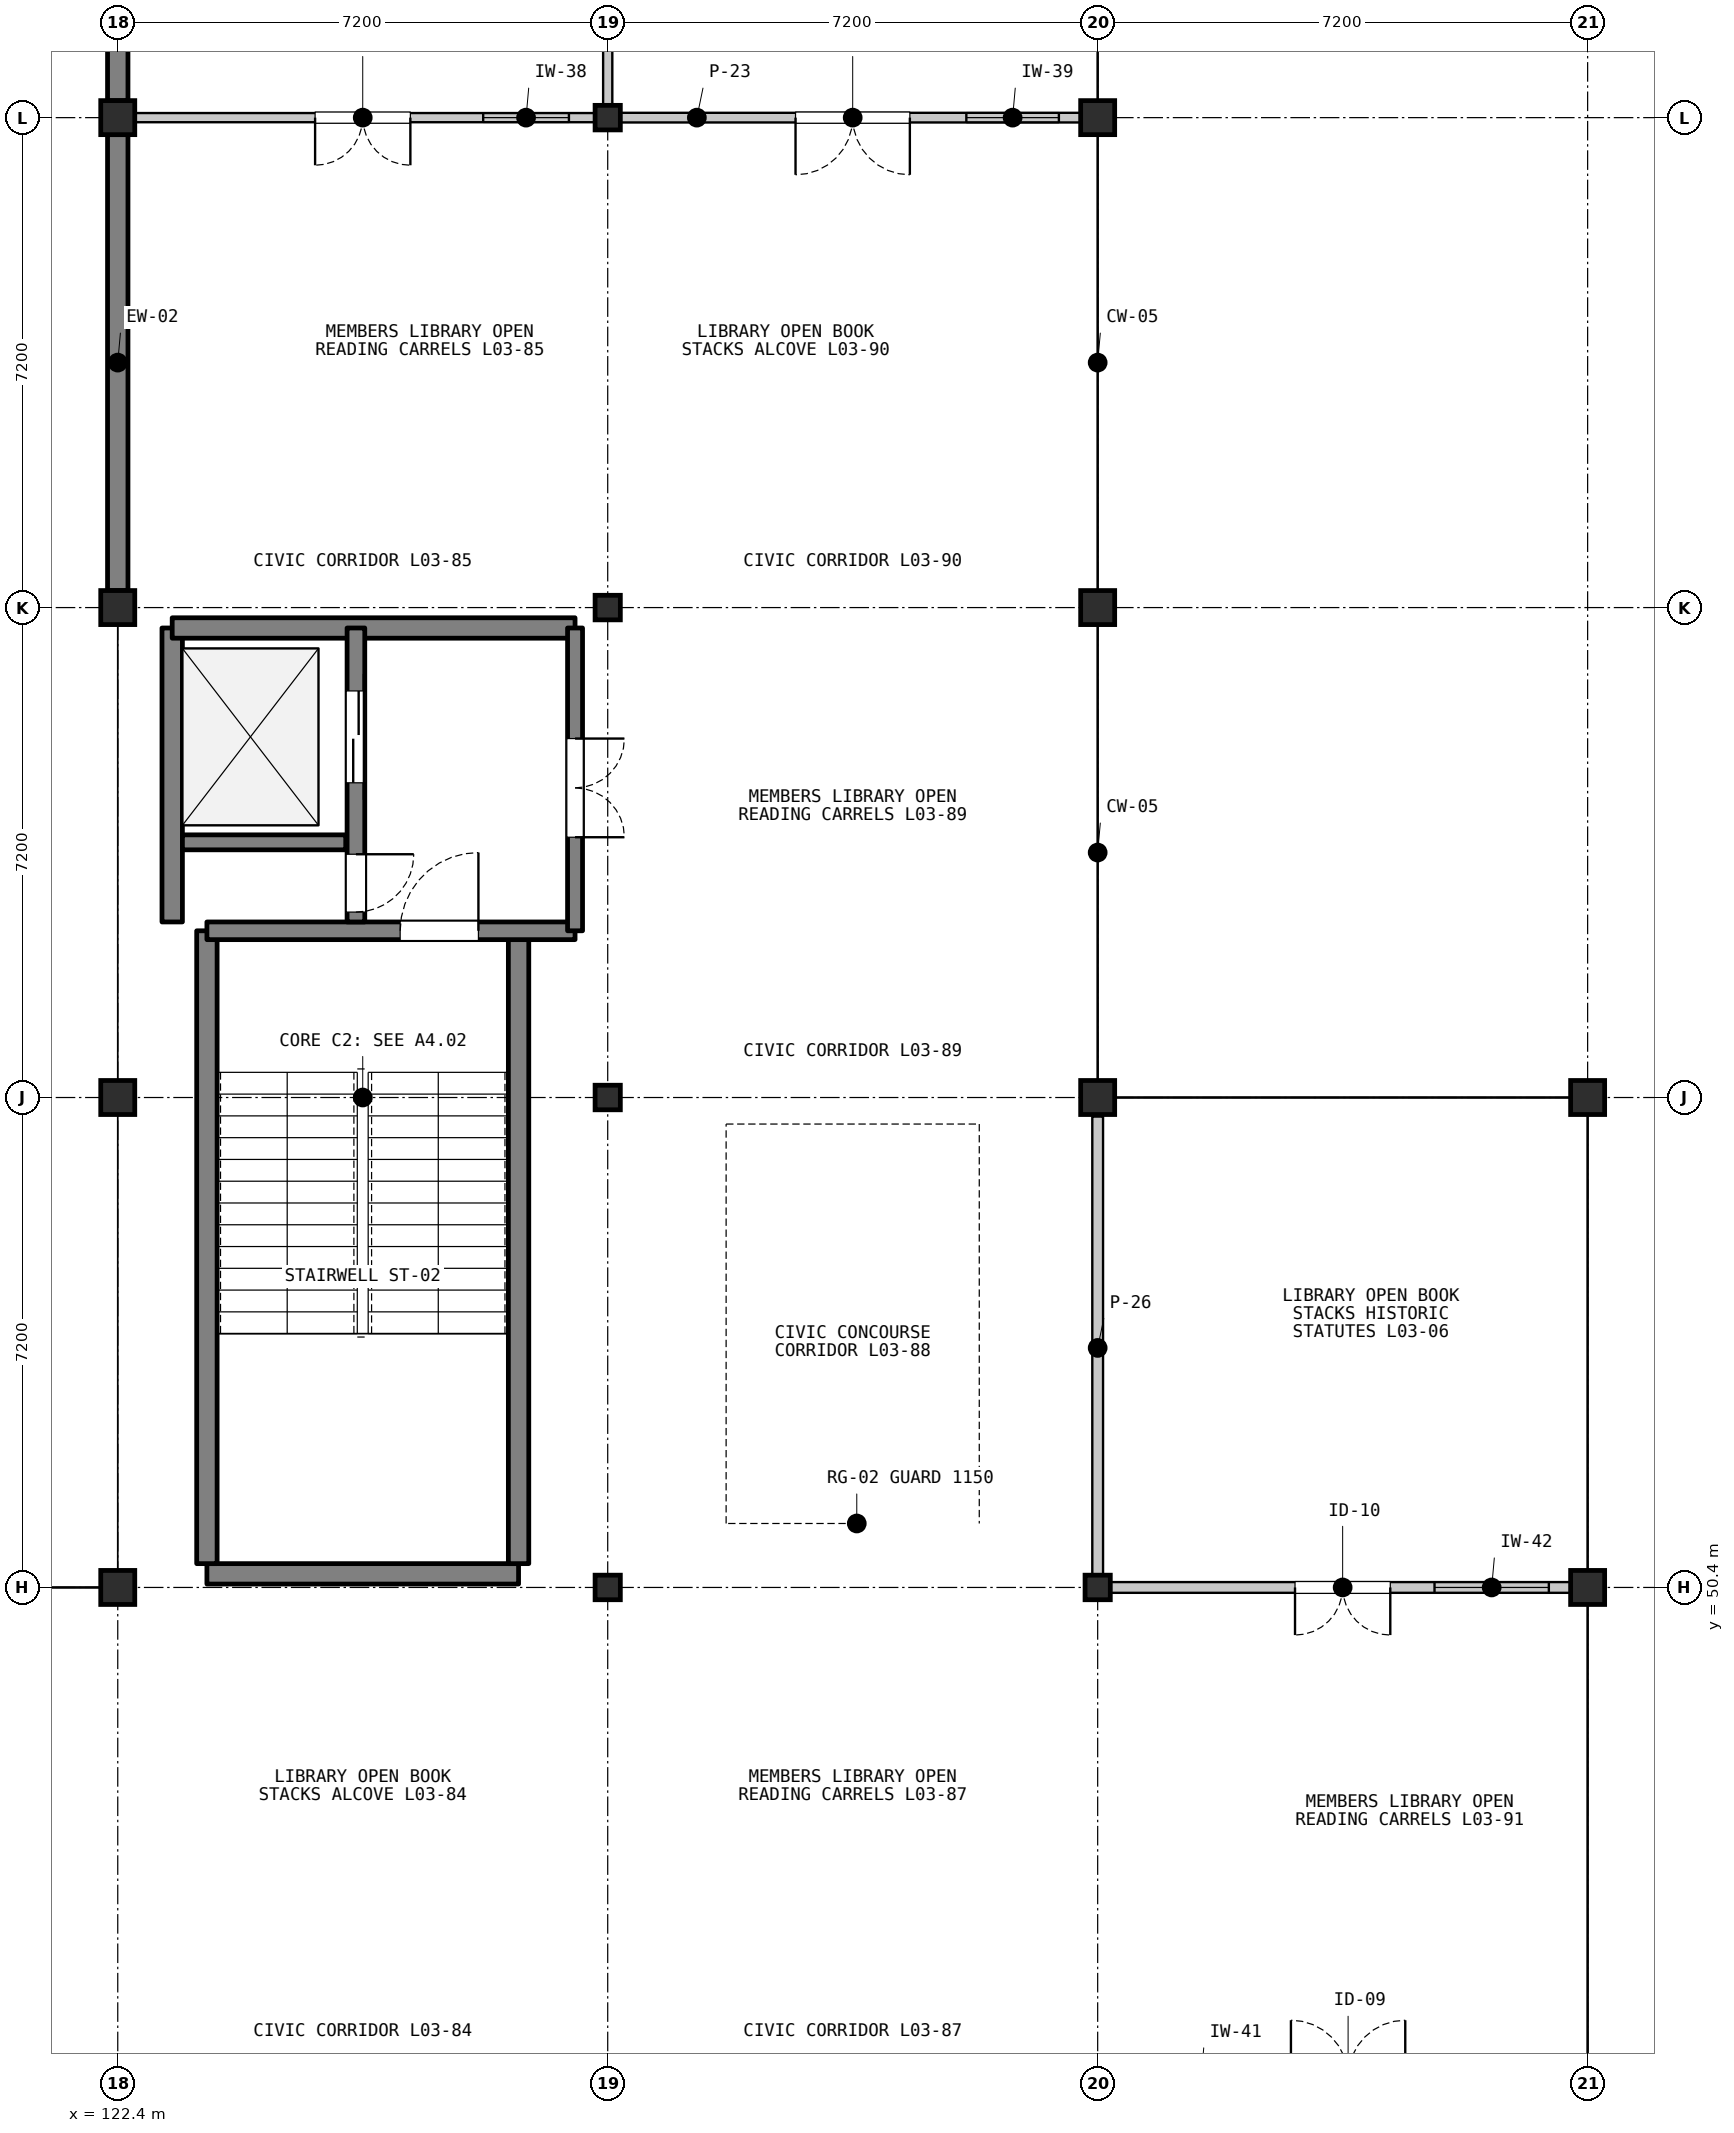
"""IFC4 building model, lengths in metres.
Left out: names, types, materials, properties, quantities, classifications, styles, units other than length and angle.
Written with IfcOpenShell. Run it as: python <this file> out.ifc"""

import sys

from ifc_helpers import new_model, si_unit, direction, frame, frame_2d, origin, origin_2d, place, context, subcontext, project, spatial, rectangle, i_section, extrude, element, fill, save


model = new_model("IFC4")
c1 = context("Model", 3, precision=1e-05, world=origin(), true_north=direction((0.0, 1.0)))
c2 = subcontext(c1, "Body", "Model", "MODEL_VIEW")
j1 = project(units=[si_unit("LENGTHUNIT", "METRE"), si_unit("PLANEANGLEUNIT", "RADIAN")], contexts=[c1])
p1 = place(None, origin())
s1 = spatial("IfcSite", under=j1, at=p1, CompositionType="ELEMENT")
p2 = place(p1, origin())
s2 = spatial("IfcBuilding", under=s1, at=p2, CompositionType="ELEMENT")
p3 = place(p2, frame((0.0, 0.0, 9.9)))
s3 = spatial("IfcBuildingStorey", under=s2, at=p3, CompositionType="ELEMENT", Elevation=9.9)
for number, where, z_axis, x_axis in (
    (1, (122.4, 50.4, 0.0), (0.0, 0.0, 1.0), (1.0, 0.0, 0.0)),
    (2, (122.4, 57.6, 0.0), (0.0, 0.0, 1.0), (1.0, 0.0, 0.0)),
    (3, (122.4, 64.8, 0.0), (0.0, 0.0, 1.0), (1.0, 0.0, 0.0)),
    (4, (122.4, 72.0, 0.0), (0.0, 0.0, 1.0), (1.0, 0.0, 0.0)),
):
    element("IfcColumn", number, at=place(p3, frame(where, z_axis=z_axis, x_axis=x_axis)), inside=s3, PredefinedType="COLUMN", context=c2, shape_type="SweptSolid", body=[
        extrude(rectangle(XDim=0.5, YDim=0.5, at=origin_2d()), origin(), (0.0, 0.0, 1.0), 4.2),
    ])
for number, where, z_axis, x_axis in (
    (5, (129.6, 50.4, 0.0), (0.0, 0.0, 1.0), (1.0, 0.0, 0.0)),
    (6, (129.6, 57.6, 0.0), (0.0, 0.0, 1.0), (1.0, 0.0, 0.0)),
    (7, (129.6, 64.8, 0.0), (0.0, 0.0, 1.0), (1.0, 0.0, 0.0)),
    (8, (129.6, 72.0, 0.0), (0.0, 0.0, 1.0), (1.0, 0.0, 0.0)),
    (9, (136.8, 50.4, 0.0), (0.0, 0.0, 1.0), (1.0, 0.0, 0.0)),
):
    element("IfcColumn", number, at=place(p3, frame(where, z_axis=z_axis, x_axis=x_axis)), inside=s3, PredefinedType="COLUMN", context=c2, shape_type="SweptSolid", body=[
        extrude(i_section(OverallWidth=0.371, OverallDepth=0.361, WebThickness=0.012, FlangeThickness=0.02, FilletRadius=0.015, at=origin_2d()), origin(), (0.0, 0.0, 1.0), 4.2),
    ])
for number, where, z_axis, x_axis in (
    (10, (136.8, 57.6, 0.0), (0.0, 0.0, 1.0), (1.0, 0.0, 0.0)),
    (11, (136.8, 64.8, 0.0), (0.0, 0.0, 1.0), (1.0, 0.0, 0.0)),
    (12, (136.8, 72.0, 0.0), (0.0, 0.0, 1.0), (1.0, 0.0, 0.0)),
    (13, (144.0, 50.4, 0.0), (0.0, 0.0, 1.0), (1.0, 0.0, 0.0)),
    (14, (144.0, 57.6, 0.0), (0.0, 0.0, 1.0), (1.0, 0.0, 0.0)),
):
    element("IfcColumn", number, at=place(p3, frame(where, z_axis=z_axis, x_axis=x_axis)), inside=s3, PredefinedType="COLUMN", context=c2, shape_type="SweptSolid", body=[
        extrude(rectangle(XDim=0.5, YDim=0.5, at=origin_2d()), origin(), (0.0, 0.0, 1.0), 4.2),
    ])
p4 = place(p3, frame((122.4, 65.05, 0.0), z_axis=(0.0, 0.0, 1.0), x_axis=(0.0, 1.0, 0.0)))
e15 = element("IfcWall", 15, at=p4, inside=s3, PredefinedType="SOLIDWALL", context=c2, shape_type="SweptSolid", body=[
    extrude(rectangle(XDim=6.7, YDim=0.3, at=frame_2d((3.35, 0.0))), origin(), (0.0, 0.0, 1.0), 3.487),
])
p5 = place(p3, frame((122.4, 72.25, 0.0), z_axis=(0.0, 0.0, 1.0), x_axis=(0.0, 1.0, 0.0)))
e16 = element("IfcWall", 16, at=p5, inside=s3, PredefinedType="SOLIDWALL", context=c2, shape_type="SweptSolid", body=[
    extrude(rectangle(XDim=6.7, YDim=0.3, at=frame_2d((3.35, 0.0))), origin(), (0.0, 0.0, 1.0), 3.487),
])
p6 = place(p5, frame((2.225, 0.0, 0.95)))
e17 = element("IfcOpeningElement", 17, at=p6, cuts=e16, PredefinedType="OPENING", context=c2, shape_type="SweptSolid", body=[
    extrude(rectangle(XDim=2.25, YDim=2.05, at=frame_2d((1.125, 1.025))), frame((0.0, 0.16, 0.0), z_axis=(0.0, -1.0, 0.0), x_axis=(1.0, 0.0, 0.0)), (0.0, 0.0, 1.0), 0.32),
])
p7 = place(p3, frame((123.71, 50.6, 0.0), z_axis=(0.0, 0.0, 1.0), x_axis=(1.0, 0.0, 0.0)))
e18 = element("IfcWall", 18, at=p7, inside=s3, PredefinedType="SHEAR", context=c2, shape_type="SweptSolid", body=[
    extrude(rectangle(XDim=4.58, YDim=0.3, at=frame_2d((2.29, 0.0))), origin(), (0.0, 0.0, 1.0), 4.02),
])
for number, where, z_axis, x_axis in (
    (19, (123.71, 50.75, 0.0), (0.0, 0.0, 1.0), (0.0, 1.0, 0.0)),
    (20, (128.29, 50.75, 0.0), (0.0, 0.0, 1.0), (0.0, 1.0, 0.0)),
):
    element("IfcWall", number, at=place(p3, frame(where, z_axis=z_axis, x_axis=x_axis)), inside=s3, PredefinedType="SHEAR", context=c2, shape_type="SweptSolid", body=[
        extrude(rectangle(XDim=9.3, YDim=0.3, at=frame_2d((4.65, 0.0))), origin(), (0.0, 0.0, 1.0), 4.02),
    ])
p8 = place(p3, frame((123.71, 60.05, 0.0), z_axis=(0.0, 0.0, 1.0), x_axis=(1.0, 0.0, 0.0)))
e21 = element("IfcWall", 21, at=p8, inside=s3, PredefinedType="SHEAR", context=c2, shape_type="SweptSolid", body=[
    extrude(rectangle(XDim=5.41, YDim=0.26, at=frame_2d((2.705, 0.0))), origin(), (0.0, 0.0, 1.0), 4.02),
])
p9 = place(p8, frame((2.84, 0.0, 0.0)))
e22 = element("IfcOpeningElement", 22, at=p9, cuts=e21, PredefinedType="OPENING", context=c2, shape_type="SweptSolid", body=[
    extrude(rectangle(XDim=1.15, YDim=2.15, at=frame_2d((0.575, 1.075))), frame((0.0, 0.14, 0.0), z_axis=(0.0, -1.0, 0.0), x_axis=(1.0, 0.0, 0.0)), (0.0, 0.0, 1.0), 0.28),
])
p10 = place(p3, frame((123.2, 60.18, 0.0), z_axis=(0.0, 0.0, 1.0), x_axis=(0.0, 1.0, 0.0)))
e23 = element("IfcWall", 23, at=p10, inside=s3, PredefinedType="SHEAR", context=c2, shape_type="SweptSolid", body=[
    extrude(rectangle(XDim=4.32, YDim=0.3, at=frame_2d((2.16, 0.0))), origin(), (0.0, 0.0, 1.0), 4.02),
])
p11 = place(p3, frame((123.2, 64.5, 0.0), z_axis=(0.0, 0.0, 1.0), x_axis=(1.0, 0.0, 0.0)))
e24 = element("IfcWall", 24, at=p11, inside=s3, PredefinedType="SHEAR", context=c2, shape_type="SweptSolid", body=[
    extrude(rectangle(XDim=5.92, YDim=0.3, at=frame_2d((2.96, 0.0))), origin(), (0.0, 0.0, 1.0), 4.02),
])
p12 = place(p3, frame((123.35, 61.35, 0.0), z_axis=(0.0, 0.0, 1.0), x_axis=(1.0, 0.0, 0.0)))
e25 = element("IfcWall", 25, at=p12, inside=s3, PredefinedType="SHEAR", context=c2, shape_type="SweptSolid", body=[
    extrude(rectangle(XDim=2.4, YDim=0.22, at=frame_2d((1.2, 0.0))), origin(), (0.0, 0.0, 1.0), 4.02),
])
p13 = place(p3, frame((125.9, 64.5, 0.0), z_axis=(0.0, 0.0, 1.0), x_axis=(0.0, -1.0, 0.0)))
e26 = element("IfcWall", 26, at=p13, inside=s3, PredefinedType="SHEAR", context=c2, shape_type="SweptSolid", body=[
    extrude(rectangle(XDim=4.32, YDim=0.26, at=frame_2d((2.16, 0.0))), origin(), (0.0, 0.0, 1.0), 4.02),
])
p14 = place(p13, frame((0.925, 0.0, 0.0)))
e27 = element("IfcOpeningElement", 27, at=p14, cuts=e26, PredefinedType="OPENING", context=c2, shape_type="SweptSolid", body=[
    extrude(rectangle(XDim=1.35, YDim=2.2, at=frame_2d((0.675, 1.1))), frame((0.0, 0.14, 0.0), z_axis=(0.0, -1.0, 0.0), x_axis=(1.0, 0.0, 0.0)), (0.0, 0.0, 1.0), 0.28),
])
p15 = place(p13, frame((3.325, 0.0, 0.0)))
e28 = element("IfcOpeningElement", 28, at=p15, cuts=e26, PredefinedType="OPENING", context=c2, shape_type="SweptSolid", body=[
    extrude(rectangle(XDim=0.85, YDim=2.05, at=frame_2d((0.425, 1.025))), frame((0.0, 0.14, 0.0), z_axis=(0.0, -1.0, 0.0), x_axis=(1.0, 0.0, 0.0)), (0.0, 0.0, 1.0), 0.28),
])
p16 = place(p3, frame((129.12, 64.5, 0.0), z_axis=(0.0, 0.0, 1.0), x_axis=(0.0, -1.0, 0.0)))
e29 = element("IfcWall", 29, at=p16, inside=s3, PredefinedType="SHEAR", context=c2, shape_type="SweptSolid", body=[
    extrude(rectangle(XDim=4.45, YDim=0.22, at=frame_2d((2.225, 0.0))), origin(), (0.0, 0.0, 1.0), 4.02),
])
p17 = place(p16, frame((1.625, 0.0, 0.0)))
e30 = element("IfcOpeningElement", 30, at=p17, cuts=e29, PredefinedType="OPENING", context=c2, shape_type="SweptSolid", body=[
    extrude(rectangle(XDim=1.45, YDim=2.2, at=frame_2d((0.725, 1.1))), frame((0.0, 0.12, 0.0), z_axis=(0.0, -1.0, 0.0), x_axis=(1.0, 0.0, 0.0)), (0.0, 0.0, 1.0), 0.24),
])
p18 = place(p3, frame((129.48, 72.0, 0.0), z_axis=(0.0, 0.0, 1.0), x_axis=(-1.0, 0.0, 0.0)))
e31 = element("IfcWall", 31, at=p18, inside=s3, PredefinedType="PARTITIONING", context=c2, shape_type="SweptSolid", body=[
    extrude(rectangle(XDim=6.96, YDim=0.135, at=frame_2d((3.48, 0.0))), origin(), (0.0, 0.0, 1.0), 3.398),
])
p19 = place(p18, frame((2.78, 0.0, 0.0)))
e32 = element("IfcOpeningElement", 32, at=p19, cuts=e31, PredefinedType="OPENING", context=c2, shape_type="SweptSolid", body=[
    extrude(rectangle(XDim=1.4, YDim=2.25, at=frame_2d((0.7, 1.125))), frame((0.0, 0.077, 0.0), z_axis=(0.0, -1.0, 0.0), x_axis=(1.0, 0.0, 0.0)), (0.0, 0.0, 1.0), 0.155),
])
p20 = place(p18, frame((0.45, 0.0, 1.05)))
e33 = element("IfcOpeningElement", 33, at=p20, cuts=e31, PredefinedType="OPENING", context=c2, shape_type="SweptSolid", body=[
    extrude(rectangle(XDim=1.26, YDim=1.1, at=frame_2d((0.63, 0.55))), frame((0.0, 0.077, 0.0), z_axis=(0.0, -1.0, 0.0), x_axis=(1.0, 0.0, 0.0)), (0.0, 0.0, 1.0), 0.155),
])
p21 = place(p3, frame((129.6, 79.08, 0.0), z_axis=(0.0, 0.0, 1.0), x_axis=(0.0, -1.0, 0.0)))
e34 = element("IfcWall", 34, at=p21, inside=s3, PredefinedType="PARTITIONING", context=c2, shape_type="SweptSolid", body=[
    extrude(rectangle(XDim=6.96, YDim=0.135, at=frame_2d((3.48, 0.0))), origin(), (0.0, 0.0, 1.0), 3.398),
])
p22 = place(p3, frame((136.68, 72.0, 0.0), z_axis=(0.0, 0.0, 1.0), x_axis=(-1.0, 0.0, 0.0)))
e35 = element("IfcWall", 35, at=p22, inside=s3, PredefinedType="PARTITIONING", context=c2, shape_type="SweptSolid", body=[
    extrude(rectangle(XDim=6.96, YDim=0.142, at=frame_2d((3.48, 0.0))), origin(), (0.0, 0.0, 1.0), 3.398),
])
p23 = place(p22, frame((2.64, 0.0, 0.0)))
e36 = element("IfcOpeningElement", 36, at=p23, cuts=e35, PredefinedType="OPENING", context=c2, shape_type="SweptSolid", body=[
    extrude(rectangle(XDim=1.68, YDim=2.35, at=frame_2d((0.84, 1.175))), frame((0.0, 0.081, 0.0), z_axis=(0.0, -1.0, 0.0), x_axis=(1.0, 0.0, 0.0)), (0.0, 0.0, 1.0), 0.162),
])
p24 = place(p22, frame((0.45, 0.0, 1.05)))
e37 = element("IfcOpeningElement", 37, at=p24, cuts=e35, PredefinedType="OPENING", context=c2, shape_type="SweptSolid", body=[
    extrude(rectangle(XDim=1.36, YDim=1.1, at=frame_2d((0.68, 0.55))), frame((0.0, 0.081, 0.0), z_axis=(0.0, -1.0, 0.0), x_axis=(1.0, 0.0, 0.0)), (0.0, 0.0, 1.0), 0.162),
])
p25 = place(p3, frame((143.88, 50.4, 0.0), z_axis=(0.0, 0.0, 1.0), x_axis=(-1.0, 0.0, 0.0)))
e38 = element("IfcWall", 38, at=p25, inside=s3, PredefinedType="PARTITIONING", context=c2, shape_type="SweptSolid", body=[
    extrude(rectangle(XDim=6.96, YDim=0.158, at=frame_2d((3.48, 0.0))), origin(), (0.0, 0.0, 1.0), 3.398),
])
p26 = place(p25, frame((2.78, 0.0, 0.0)))
e39 = element("IfcOpeningElement", 39, at=p26, cuts=e38, PredefinedType="OPENING", context=c2, shape_type="SweptSolid", body=[
    extrude(rectangle(XDim=1.4, YDim=2.25, at=frame_2d((0.7, 1.125))), frame((0.0, 0.089, 0.0), z_axis=(0.0, -1.0, 0.0), x_axis=(1.0, 0.0, 0.0)), (0.0, 0.0, 1.0), 0.178),
])
p27 = place(p25, frame((0.45, 0.0, 1.05)))
e40 = element("IfcOpeningElement", 40, at=p27, cuts=e38, PredefinedType="OPENING", context=c2, shape_type="SweptSolid", body=[
    extrude(rectangle(XDim=1.68, YDim=1.34, at=frame_2d((0.84, 0.67))), frame((0.0, 0.089, 0.0), z_axis=(0.0, -1.0, 0.0), x_axis=(1.0, 0.0, 0.0)), (0.0, 0.0, 1.0), 0.178),
])
p28 = place(p3, frame((136.8, 50.52, 0.0), z_axis=(0.0, 0.0, 1.0), x_axis=(0.0, 1.0, 0.0)))
e41 = element("IfcWall", 41, at=p28, inside=s3, PredefinedType="PARTITIONING", context=c2, shape_type="SweptSolid", body=[
    extrude(rectangle(XDim=6.8, YDim=0.158, at=frame_2d((3.4, 0.0))), origin(), (0.0, 0.0, 1.0), 3.398),
])
p29 = place(p9, origin())
e42 = element("IfcDoor", 42, at=p29, inside=s3, OperationType="SINGLE_SWING_RIGHT", PredefinedType="DOOR", context=c2, shape_type="SweptSolid", body=[
    extrude(rectangle(XDim=1.15, YDim=2.15, at=frame_2d((0.575, 1.075))), frame((0.0, 0.025, 0.0), z_axis=(0.0, -1.0, 0.0), x_axis=(1.0, 0.0, 0.0)), (0.0, 0.0, 1.0), 0.05),
])
fill(e22, e42)
p30 = place(p14, origin())
e43 = element("IfcDoor", 43, at=p30, inside=s3, OperationType="DOUBLE_DOOR_SLIDING", PredefinedType="DOOR", context=c2, shape_type="SweptSolid", body=[
    extrude(rectangle(XDim=1.35, YDim=2.2, at=frame_2d((0.675, 1.1))), frame((0.0, 0.025, 0.0), z_axis=(0.0, -1.0, 0.0), x_axis=(1.0, 0.0, 0.0)), (0.0, 0.0, 1.0), 0.05),
])
fill(e27, e43)
p31 = place(p15, origin())
e44 = element("IfcDoor", 44, at=p31, inside=s3, OperationType="SINGLE_SWING_LEFT", PredefinedType="DOOR", context=c2, shape_type="SweptSolid", body=[
    extrude(rectangle(XDim=0.85, YDim=2.05, at=frame_2d((0.425, 1.025))), frame((0.0, 0.025, 0.0), z_axis=(0.0, -1.0, 0.0), x_axis=(1.0, 0.0, 0.0)), (0.0, 0.0, 1.0), 0.05),
])
fill(e28, e44)
p32 = place(p17, origin())
e45 = element("IfcDoor", 45, at=p32, inside=s3, OperationType="DOUBLE_DOOR_SINGLE_SWING", PredefinedType="DOOR", context=c2, shape_type="SweptSolid", body=[
    extrude(rectangle(XDim=1.45, YDim=2.2, at=frame_2d((0.725, 1.1))), frame((0.0, 0.025, 0.0), z_axis=(0.0, -1.0, 0.0), x_axis=(1.0, 0.0, 0.0)), (0.0, 0.0, 1.0), 0.05),
])
fill(e30, e45)
p33 = place(p19, origin())
e46 = element("IfcDoor", 46, at=p33, inside=s3, OperationType="DOUBLE_DOOR_SINGLE_SWING", PredefinedType="DOOR", context=c2, shape_type="SweptSolid", body=[
    extrude(rectangle(XDim=1.4, YDim=2.25, at=frame_2d((0.7, 1.125))), frame((0.0, 0.025, 0.0), z_axis=(0.0, -1.0, 0.0), x_axis=(1.0, 0.0, 0.0)), (0.0, 0.0, 1.0), 0.05),
])
fill(e32, e46)
p34 = place(p20, origin())
e47 = element("IfcWindow", 47, at=p34, inside=s3, PartitioningType="SINGLE_PANEL", PredefinedType="WINDOW", context=c2, shape_type="SweptSolid", body=[
    extrude(rectangle(XDim=1.26, YDim=1.1, at=frame_2d((0.63, 0.55))), frame((0.0, 0.03, 0.0), z_axis=(0.0, -1.0, 0.0), x_axis=(1.0, 0.0, 0.0)), (0.0, 0.0, 1.0), 0.06),
])
fill(e33, e47)
p35 = place(p23, origin())
e48 = element("IfcDoor", 48, at=p35, inside=s3, OperationType="DOUBLE_DOOR_SINGLE_SWING", PredefinedType="DOOR", context=c2, shape_type="SweptSolid", body=[
    extrude(rectangle(XDim=1.68, YDim=2.35, at=frame_2d((0.84, 1.175))), frame((0.0, 0.025, 0.0), z_axis=(0.0, -1.0, 0.0), x_axis=(1.0, 0.0, 0.0)), (0.0, 0.0, 1.0), 0.05),
])
fill(e36, e48)
p36 = place(p24, origin())
e49 = element("IfcWindow", 49, at=p36, inside=s3, PartitioningType="SINGLE_PANEL", PredefinedType="WINDOW", context=c2, shape_type="SweptSolid", body=[
    extrude(rectangle(XDim=1.36, YDim=1.1, at=frame_2d((0.68, 0.55))), frame((0.0, 0.03, 0.0), z_axis=(0.0, -1.0, 0.0), x_axis=(1.0, 0.0, 0.0)), (0.0, 0.0, 1.0), 0.06),
])
fill(e37, e49)
p37 = place(p26, origin())
e50 = element("IfcDoor", 50, at=p37, inside=s3, OperationType="DOUBLE_DOOR_SINGLE_SWING", PredefinedType="DOOR", context=c2, shape_type="SweptSolid", body=[
    extrude(rectangle(XDim=1.4, YDim=2.25, at=frame_2d((0.7, 1.125))), frame((0.0, 0.025, 0.0), z_axis=(0.0, -1.0, 0.0), x_axis=(1.0, 0.0, 0.0)), (0.0, 0.0, 1.0), 0.05),
])
fill(e39, e50)
p38 = place(p27, origin())
e51 = element("IfcWindow", 51, at=p38, inside=s3, PartitioningType="SINGLE_PANEL", PredefinedType="WINDOW", context=c2, shape_type="SweptSolid", body=[
    extrude(rectangle(XDim=1.68, YDim=1.34, at=frame_2d((0.84, 0.67))), frame((0.0, 0.03, 0.0), z_axis=(0.0, -1.0, 0.0), x_axis=(1.0, 0.0, 0.0)), (0.0, 0.0, 1.0), 0.06),
])
fill(e40, e51)
save(model, sys.argv[1])
